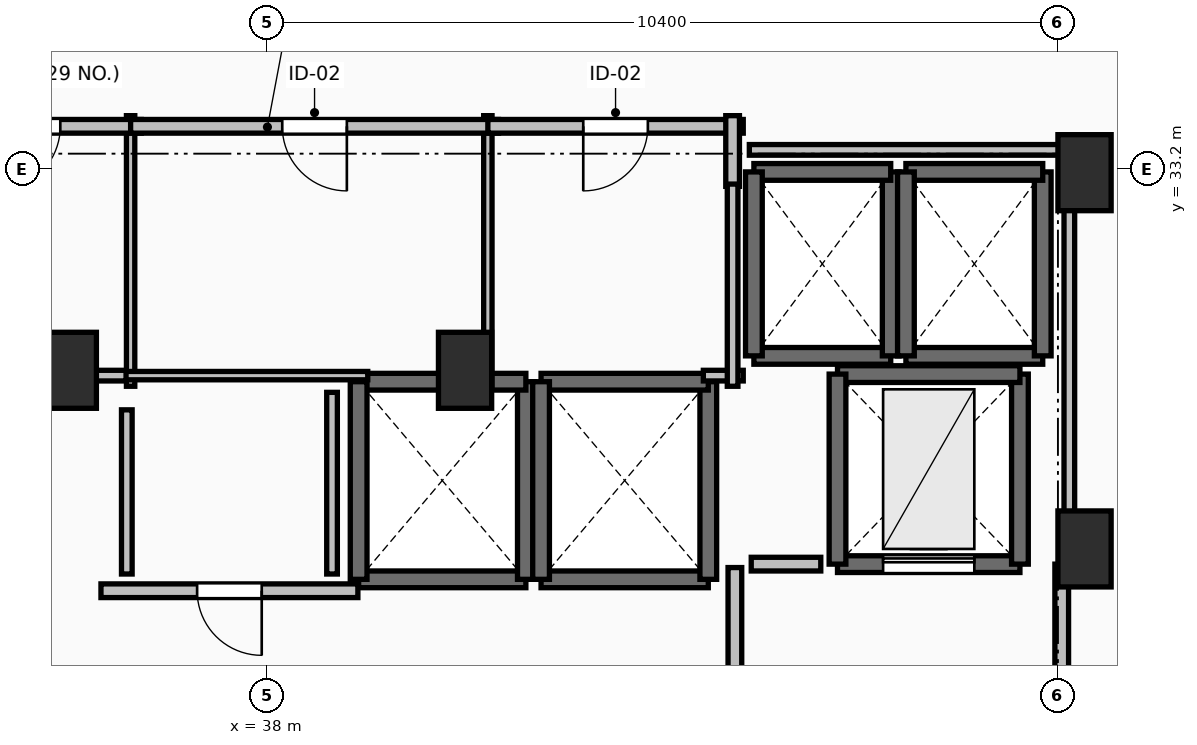
"""IFC4 building model, lengths in metres.
Left out: names, types, materials, properties, quantities, classifications, styles, units other than length and angle.
Written with IfcOpenShell. Run it as: python <this file> out.ifc"""

import sys

from ifc_helpers import new_model, si_unit, direction, frame, frame_2d, origin, origin_2d, place, context, subcontext, project, spatial, rectangle, extrude, element, fill, save


model = new_model("IFC4")
c1 = context("Model", 3, precision=1e-05, world=origin(), true_north=direction((0.0, 1.0)))
c2 = subcontext(c1, "Body", "Model", "MODEL_VIEW")
j1 = project(units=[si_unit("LENGTHUNIT", "METRE"), si_unit("PLANEANGLEUNIT", "RADIAN")], contexts=[c1])
p1 = place(None, origin())
s1 = spatial("IfcSite", under=j1, at=p1, CompositionType="ELEMENT")
p2 = place(p1, origin())
s2 = spatial("IfcBuilding", under=s1, at=p2, CompositionType="ELEMENT")
p3 = place(p2, frame((0.0, 0.0, 203.65)))
s3 = spatial("IfcBuildingStorey", under=s2, at=p3, CompositionType="ELEMENT", Elevation=203.65)
for number, where, z_axis, x_axis in (
    (1, (48.75, 33.15, 0.0), (0.0, 0.0, 1.0), (1.0, 0.0, 0.0)),
    (2, (48.75, 28.2, 0.0), (0.0, 0.0, 1.0), (1.0, 0.0, 0.0)),
    (3, (35.4, 30.55, 0.0), (0.0, 0.0, 1.0), (1.0, 0.0, 0.0)),
    (4, (40.6, 30.55, 0.0), (0.0, 0.0, 1.0), (1.0, 0.0, 0.0)),
):
    element("IfcColumn", number, at=place(p3, frame(where, z_axis=z_axis, x_axis=x_axis)), inside=s3, PredefinedType="PILASTER", context=c2, shape_type="SweptSolid", body=[
        extrude(rectangle(XDim=0.7, YDim=1.0, at=origin_2d()), origin(), (0.0, 0.0, 1.0), 3.55),
    ])
p4 = place(p3, frame((39.2, 27.8, 0.0), z_axis=(0.0, 0.0, 1.0), x_axis=(1.0, 0.0, 0.0)))
e5 = element("IfcWall", 5, at=p4, inside=s3, PredefinedType="SOLIDWALL", context=c2, shape_type="SweptSolid", body=[
    extrude(rectangle(XDim=2.2, YDim=0.22, at=frame_2d((1.1, 0.0))), origin(), (0.0, 0.0, 1.0), 3.29),
])
p5 = place(p3, frame((41.4, 27.8, 0.0), z_axis=(0.0, 0.0, 1.0), x_axis=(0.0, 1.0, 0.0)))
e6 = element("IfcWall", 6, at=p5, inside=s3, PredefinedType="SOLIDWALL", context=c2, shape_type="SweptSolid", body=[
    extrude(rectangle(XDim=2.6, YDim=0.22, at=frame_2d((1.3, 0.0))), origin(), (0.0, 0.0, 1.0), 3.29),
])
p6 = place(p3, frame((41.4, 30.4, 0.0), z_axis=(0.0, 0.0, 1.0), x_axis=(-1.0, 0.0, 0.0)))
e7 = element("IfcWall", 7, at=p6, inside=s3, PredefinedType="SOLIDWALL", context=c2, shape_type="SweptSolid", body=[
    extrude(rectangle(XDim=2.2, YDim=0.22, at=frame_2d((1.1, 0.0))), origin(), (0.0, 0.0, 1.0), 3.29),
])
p7 = place(p3, frame((39.2, 30.4, 0.0), z_axis=(0.0, 0.0, 1.0), x_axis=(0.0, -1.0, 0.0)))
e8 = element("IfcWall", 8, at=p7, inside=s3, PredefinedType="SOLIDWALL", context=c2, shape_type="SweptSolid", body=[
    extrude(rectangle(XDim=2.6, YDim=0.22, at=frame_2d((1.3, 0.0))), origin(), (0.0, 0.0, 1.0), 3.29),
])
p8 = place(p3, frame((41.6, 27.8, 0.0), z_axis=(0.0, 0.0, 1.0), x_axis=(1.0, 0.0, 0.0)))
e9 = element("IfcWall", 9, at=p8, inside=s3, PredefinedType="SOLIDWALL", context=c2, shape_type="SweptSolid", body=[
    extrude(rectangle(XDim=2.2, YDim=0.22, at=frame_2d((1.1, 0.0))), origin(), (0.0, 0.0, 1.0), 3.29),
])
p9 = place(p3, frame((43.8, 27.8, 0.0), z_axis=(0.0, 0.0, 1.0), x_axis=(0.0, 1.0, 0.0)))
e10 = element("IfcWall", 10, at=p9, inside=s3, PredefinedType="SOLIDWALL", context=c2, shape_type="SweptSolid", body=[
    extrude(rectangle(XDim=2.6, YDim=0.22, at=frame_2d((1.3, 0.0))), origin(), (0.0, 0.0, 1.0), 3.29),
])
p10 = place(p3, frame((43.8, 30.4, 0.0), z_axis=(0.0, 0.0, 1.0), x_axis=(-1.0, 0.0, 0.0)))
e11 = element("IfcWall", 11, at=p10, inside=s3, PredefinedType="SOLIDWALL", context=c2, shape_type="SweptSolid", body=[
    extrude(rectangle(XDim=2.2, YDim=0.22, at=frame_2d((1.1, 0.0))), origin(), (0.0, 0.0, 1.0), 3.29),
])
p11 = place(p3, frame((41.6, 30.4, 0.0), z_axis=(0.0, 0.0, 1.0), x_axis=(0.0, -1.0, 0.0)))
e12 = element("IfcWall", 12, at=p11, inside=s3, PredefinedType="SOLIDWALL", context=c2, shape_type="SweptSolid", body=[
    extrude(rectangle(XDim=2.6, YDim=0.22, at=frame_2d((1.3, 0.0))), origin(), (0.0, 0.0, 1.0), 3.29),
])
p12 = place(p3, frame((44.4, 30.74, 0.0), z_axis=(0.0, 0.0, 1.0), x_axis=(1.0, 0.0, 0.0)))
e13 = element("IfcWall", 13, at=p12, inside=s3, PredefinedType="SOLIDWALL", context=c2, shape_type="SweptSolid", body=[
    extrude(rectangle(XDim=1.8, YDim=0.22, at=frame_2d((0.9, 0.0))), origin(), (0.0, 0.0, 1.0), 3.29),
])
p13 = place(p3, frame((46.2, 30.74, 0.0), z_axis=(0.0, 0.0, 1.0), x_axis=(0.0, 1.0, 0.0)))
e14 = element("IfcWall", 14, at=p13, inside=s3, PredefinedType="SOLIDWALL", context=c2, shape_type="SweptSolid", body=[
    extrude(rectangle(XDim=2.42, YDim=0.22, at=frame_2d((1.21, 0.0))), origin(), (0.0, 0.0, 1.0), 3.29),
])
p14 = place(p3, frame((46.2, 33.16, 0.0), z_axis=(0.0, 0.0, 1.0), x_axis=(-1.0, 0.0, 0.0)))
e15 = element("IfcWall", 15, at=p14, inside=s3, PredefinedType="SOLIDWALL", context=c2, shape_type="SweptSolid", body=[
    extrude(rectangle(XDim=1.8, YDim=0.22, at=frame_2d((0.9, 0.0))), origin(), (0.0, 0.0, 1.0), 3.29),
])
p15 = place(p3, frame((44.4, 33.16, 0.0), z_axis=(0.0, 0.0, 1.0), x_axis=(0.0, -1.0, 0.0)))
e16 = element("IfcWall", 16, at=p15, inside=s3, PredefinedType="SOLIDWALL", context=c2, shape_type="SweptSolid", body=[
    extrude(rectangle(XDim=2.42, YDim=0.22, at=frame_2d((1.21, 0.0))), origin(), (0.0, 0.0, 1.0), 3.29),
])
p16 = place(p3, frame((46.4, 30.74, 0.0), z_axis=(0.0, 0.0, 1.0), x_axis=(1.0, 0.0, 0.0)))
e17 = element("IfcWall", 17, at=p16, inside=s3, PredefinedType="SOLIDWALL", context=c2, shape_type="SweptSolid", body=[
    extrude(rectangle(XDim=1.8, YDim=0.22, at=frame_2d((0.9, 0.0))), origin(), (0.0, 0.0, 1.0), 3.29),
])
p17 = place(p3, frame((48.2, 30.74, 0.0), z_axis=(0.0, 0.0, 1.0), x_axis=(0.0, 1.0, 0.0)))
e18 = element("IfcWall", 18, at=p17, inside=s3, PredefinedType="SOLIDWALL", context=c2, shape_type="SweptSolid", body=[
    extrude(rectangle(XDim=2.42, YDim=0.22, at=frame_2d((1.21, 0.0))), origin(), (0.0, 0.0, 1.0), 3.29),
])
p18 = place(p3, frame((48.2, 33.16, 0.0), z_axis=(0.0, 0.0, 1.0), x_axis=(-1.0, 0.0, 0.0)))
e19 = element("IfcWall", 19, at=p18, inside=s3, PredefinedType="SOLIDWALL", context=c2, shape_type="SweptSolid", body=[
    extrude(rectangle(XDim=1.8, YDim=0.22, at=frame_2d((0.9, 0.0))), origin(), (0.0, 0.0, 1.0), 3.29),
])
p19 = place(p3, frame((46.4, 33.16, 0.0), z_axis=(0.0, 0.0, 1.0), x_axis=(0.0, -1.0, 0.0)))
e20 = element("IfcWall", 20, at=p19, inside=s3, PredefinedType="SOLIDWALL", context=c2, shape_type="SweptSolid", body=[
    extrude(rectangle(XDim=2.42, YDim=0.22, at=frame_2d((1.21, 0.0))), origin(), (0.0, 0.0, 1.0), 3.29),
])
p20 = place(p3, frame((45.5, 28.0, 0.0), z_axis=(0.0, 0.0, 1.0), x_axis=(1.0, 0.0, 0.0)))
e21 = element("IfcWall", 21, at=p20, inside=s3, PredefinedType="SHEAR", context=c2, shape_type="SweptSolid", body=[
    extrude(rectangle(XDim=2.4, YDim=0.22, at=frame_2d((1.2, 0.0))), origin(), (0.0, 0.0, 1.0), 3.29),
])
p21 = place(p20, frame((0.6, 0.0, 0.0)))
e22 = element("IfcOpeningElement", 22, at=p21, cuts=e21, PredefinedType="OPENING", context=c2, shape_type="SweptSolid", body=[
    extrude(rectangle(XDim=1.2, YDim=2.2, at=frame_2d((0.6, 1.1))), frame((0.0, 0.125, 0.0), z_axis=(0.0, -1.0, 0.0), x_axis=(1.0, 0.0, 0.0)), (0.0, 0.0, 1.0), 0.25),
])
p22 = place(p3, frame((47.9, 28.0, 0.0), z_axis=(0.0, 0.0, 1.0), x_axis=(0.0, 1.0, 0.0)))
e23 = element("IfcWall", 23, at=p22, inside=s3, PredefinedType="SHEAR", context=c2, shape_type="SweptSolid", body=[
    extrude(rectangle(XDim=2.5, YDim=0.22, at=frame_2d((1.25, 0.0))), origin(), (0.0, 0.0, 1.0), 3.29),
])
p23 = place(p3, frame((47.9, 30.5, 0.0), z_axis=(0.0, 0.0, 1.0), x_axis=(-1.0, 0.0, 0.0)))
e24 = element("IfcWall", 24, at=p23, inside=s3, PredefinedType="SHEAR", context=c2, shape_type="SweptSolid", body=[
    extrude(rectangle(XDim=2.4, YDim=0.22, at=frame_2d((1.2, 0.0))), origin(), (0.0, 0.0, 1.0), 3.29),
])
p24 = place(p3, frame((45.5, 30.5, 0.0), z_axis=(0.0, 0.0, 1.0), x_axis=(0.0, -1.0, 0.0)))
e25 = element("IfcWall", 25, at=p24, inside=s3, PredefinedType="SHEAR", context=c2, shape_type="SweptSolid", body=[
    extrude(rectangle(XDim=2.5, YDim=0.22, at=frame_2d((1.25, 0.0))), origin(), (0.0, 0.0, 1.0), 3.29),
])
p25 = place(p3, frame((44.15, 27.955, 0.0), z_axis=(0.0, 0.0, 1.0), x_axis=(0.0, -1.0, 0.0)))
e26 = element("IfcWall", 26, at=p25, inside=s3, PredefinedType="PARTITIONING", context=c2, shape_type="SweptSolid", body=[
    extrude(rectangle(XDim=3.91, YDim=0.18, at=frame_2d((1.955, 0.0))), origin(), (0.0, 0.0, 1.0), 3.29),
])
p26 = place(p25, frame((1.355, 0.0, 0.0)))
e27 = element("IfcOpeningElement", 27, at=p26, cuts=e26, PredefinedType="OPENING", context=c2, shape_type="SweptSolid", body=[
    extrude(rectangle(XDim=1.2, YDim=2.15, at=frame_2d((0.6, 1.075))), frame((0.0, 0.105, 0.0), z_axis=(0.0, -1.0, 0.0), x_axis=(1.0, 0.0, 0.0)), (0.0, 0.0, 1.0), 0.21),
])
p27 = place(p3, frame((48.45, 23.95, 0.0), z_axis=(0.0, 0.0, 1.0), x_axis=(0.0, 1.0, 0.0)))
e28 = element("IfcWall", 28, at=p27, inside=s3, PredefinedType="PARTITIONING", context=c2, shape_type="SweptSolid", body=[
    extrude(rectangle(XDim=4.05, YDim=0.18, at=frame_2d((2.025, 0.0))), origin(), (0.0, 0.0, 1.0), 3.29),
])
p28 = place(p27, frame((1.425, 0.0, 0.0)))
e29 = element("IfcOpeningElement", 29, at=p28, cuts=e28, PredefinedType="OPENING", context=c2, shape_type="SweptSolid", body=[
    extrude(rectangle(XDim=1.2, YDim=2.15, at=frame_2d((0.6, 1.075))), frame((0.0, 0.105, 0.0), z_axis=(0.0, -1.0, 0.0), x_axis=(1.0, 0.0, 0.0)), (0.0, 0.0, 1.0), 0.21),
])
p29 = place(p3, frame((39.19, 27.65, 0.0), z_axis=(0.0, 0.0, 1.0), x_axis=(-1.0, 0.0, 0.0)))
e30 = element("IfcWall", 30, at=p29, inside=s3, PredefinedType="PARTITIONING", context=c2, shape_type="SweptSolid", body=[
    extrude(rectangle(XDim=3.38, YDim=0.18, at=frame_2d((1.69, 0.0))), origin(), (0.0, 0.0, 1.0), 3.29),
])
p30 = place(p29, frame((1.265, 0.0, 0.0)))
e31 = element("IfcOpeningElement", 31, at=p30, cuts=e30, PredefinedType="OPENING", context=c2, shape_type="SweptSolid", body=[
    extrude(rectangle(XDim=0.85, YDim=2.1, at=frame_2d((0.425, 1.05))), frame((0.0, 0.105, 0.0), z_axis=(0.0, -1.0, 0.0), x_axis=(1.0, 0.0, 0.0)), (0.0, 0.0, 1.0), 0.21),
])
p31 = place(p3, frame((36.2, 30.34, 0.0), z_axis=(0.0, 0.0, 1.0), x_axis=(0.0, 1.0, 0.0)))
e32 = element("IfcWall", 32, at=p31, inside=s3, PredefinedType="PARTITIONING", context=c2, shape_type="SweptSolid", body=[
    extrude(rectangle(XDim=3.56, YDim=0.11, at=frame_2d((1.78, 0.0))), origin(), (0.0, 0.0, 1.0), 2.482),
])
p32 = place(p3, frame((36.34, 33.76, 0.0), z_axis=(0.0, 0.0, 1.0), x_axis=(-1.0, 0.0, 0.0)))
e33 = element("IfcWall", 33, at=p32, inside=s3, PredefinedType="PARTITIONING", context=c2, shape_type="SweptSolid", body=[
    extrude(rectangle(XDim=2.98, YDim=0.18, at=frame_2d((1.49, 0.0))), origin(), (0.0, 0.0, 1.0), 3.29),
])
p33 = place(p32, frame((1.065, 0.0, 0.0)))
e34 = element("IfcOpeningElement", 34, at=p33, cuts=e33, PredefinedType="OPENING", context=c2, shape_type="SweptSolid", body=[
    extrude(rectangle(XDim=0.85, YDim=2.1, at=frame_2d((0.425, 1.05))), frame((0.0, 0.105, 0.0), z_axis=(0.0, -1.0, 0.0), x_axis=(1.0, 0.0, 0.0)), (0.0, 0.0, 1.0), 0.21),
])
p34 = place(p3, frame((40.9, 30.34, 0.0), z_axis=(0.0, 0.0, 1.0), x_axis=(0.0, 1.0, 0.0)))
e35 = element("IfcWall", 35, at=p34, inside=s3, PredefinedType="PARTITIONING", context=c2, shape_type="SweptSolid", body=[
    extrude(rectangle(XDim=3.56, YDim=0.11, at=frame_2d((1.78, 0.0))), origin(), (0.0, 0.0, 1.0), 3.29),
])
p35 = place(p3, frame((36.11, 30.48, 0.0), z_axis=(0.0, 0.0, 1.0), x_axis=(1.0, 0.0, 0.0)))
e36 = element("IfcWall", 36, at=p35, inside=s3, PredefinedType="PARTITIONING", context=c2, shape_type="SweptSolid", body=[
    extrude(rectangle(XDim=3.21, YDim=0.11, at=frame_2d((1.605, 0.0))), origin(), (0.0, 0.0, 1.0), 2.482),
])
p36 = place(p3, frame((41.04, 33.76, 0.0), z_axis=(0.0, 0.0, 1.0), x_axis=(-1.0, 0.0, 0.0)))
e37 = element("IfcWall", 37, at=p36, inside=s3, PredefinedType="PARTITIONING", context=c2, shape_type="SweptSolid", body=[
    extrude(rectangle(XDim=4.84, YDim=0.18, at=frame_2d((2.42, 0.0))), origin(), (0.0, 0.0, 1.0), 3.29),
])
p37 = place(p36, frame((1.995, 0.0, 0.0)))
e38 = element("IfcOpeningElement", 38, at=p37, cuts=e37, PredefinedType="OPENING", context=c2, shape_type="SweptSolid", body=[
    extrude(rectangle(XDim=0.85, YDim=2.1, at=frame_2d((0.425, 1.05))), frame((0.0, 0.105, 0.0), z_axis=(0.0, -1.0, 0.0), x_axis=(1.0, 0.0, 0.0)), (0.0, 0.0, 1.0), 0.21),
])
p38 = place(p3, frame((44.26, 33.76, 0.0), z_axis=(0.0, 0.0, 1.0), x_axis=(-1.0, 0.0, 0.0)))
e39 = element("IfcWall", 39, at=p38, inside=s3, PredefinedType="PARTITIONING", context=c2, shape_type="SweptSolid", body=[
    extrude(rectangle(XDim=3.36, YDim=0.18, at=frame_2d((1.68, 0.0))), origin(), (0.0, 0.0, 1.0), 3.29),
])
p39 = place(p38, frame((1.255, 0.0, 0.0)))
e40 = element("IfcOpeningElement", 40, at=p39, cuts=e39, PredefinedType="OPENING", context=c2, shape_type="SweptSolid", body=[
    extrude(rectangle(XDim=0.85, YDim=2.1, at=frame_2d((0.425, 1.05))), frame((0.0, 0.105, 0.0), z_axis=(0.0, -1.0, 0.0), x_axis=(1.0, 0.0, 0.0)), (0.0, 0.0, 1.0), 0.21),
])
p40 = place(p3, frame((44.12, 32.97, 0.0), z_axis=(0.0, 0.0, 1.0), x_axis=(0.0, 1.0, 0.0)))
e41 = element("IfcWall", 41, at=p40, inside=s3, PredefinedType="PARTITIONING", context=c2, shape_type="SweptSolid", body=[
    extrude(rectangle(XDim=0.93, YDim=0.18, at=frame_2d((0.465, 0.0))), origin(), (0.0, 0.0, 1.0), 3.29),
])
p41 = place(p3, frame((45.28, 28.0, 0.0), z_axis=(0.0, 0.0, 1.0), x_axis=(-1.0, 0.0, 0.0)))
e42 = element("IfcWall", 42, at=p41, inside=s3, PredefinedType="PARTITIONING", context=c2, shape_type="SweptSolid", body=[
    extrude(rectangle(XDim=0.915, YDim=0.18, at=frame_2d((0.458, 0.0))), origin(), (0.0, 0.0, 1.0), 3.29),
])
p42 = place(p3, frame((35.14, 30.48, 0.0), z_axis=(0.0, 0.0, 1.0), x_axis=(1.0, 0.0, 0.0)))
e43 = element("IfcWall", 43, at=p42, inside=s3, PredefinedType="PARTITIONING", context=c2, shape_type="SweptSolid", body=[
    extrude(rectangle(XDim=1.0, YDim=0.14, at=frame_2d((0.5, 0.0))), origin(), (0.0, 0.0, 1.0), 2.482),
])
p43 = place(p3, frame((43.735, 30.48, 0.0), z_axis=(0.0, 0.0, 1.0), x_axis=(1.0, 0.0, 0.0)))
e44 = element("IfcWall", 44, at=p43, inside=s3, PredefinedType="PARTITIONING", context=c2, shape_type="SweptSolid", body=[
    extrude(rectangle(XDim=0.525, YDim=0.14, at=frame_2d((0.262, 0.0))), origin(), (0.0, 0.0, 1.0), 3.29),
])
p44 = place(p3, frame((44.12, 30.34, 0.0), z_axis=(0.0, 0.0, 1.0), x_axis=(0.0, 1.0, 0.0)))
e45 = element("IfcWall", 45, at=p44, inside=s3, PredefinedType="PARTITIONING", context=c2, shape_type="SweptSolid", body=[
    extrude(rectangle(XDim=2.66, YDim=0.14, at=frame_2d((1.33, 0.0))), origin(), (0.0, 0.0, 1.0), 3.29),
])
p45 = place(p3, frame((36.15, 30.03, 0.0), z_axis=(0.0, 0.0, 1.0), x_axis=(0.0, -1.0, 0.0)))
e46 = element("IfcWall", 46, at=p45, inside=s3, PredefinedType="PARTITIONING", context=c2, shape_type="SweptSolid", body=[
    extrude(rectangle(XDim=2.16, YDim=0.14, at=frame_2d((1.08, 0.0))), origin(), (0.0, 0.0, 1.0), 3.29),
])
p46 = place(p3, frame((38.85, 27.87, 0.0), z_axis=(0.0, 0.0, 1.0), x_axis=(0.0, 1.0, 0.0)))
e47 = element("IfcWall", 47, at=p46, inside=s3, PredefinedType="PARTITIONING", context=c2, shape_type="SweptSolid", body=[
    extrude(rectangle(XDim=2.39, YDim=0.14, at=frame_2d((1.195, 0.0))), origin(), (0.0, 0.0, 1.0), 3.29),
])
p47 = place(p3, frame((48.55, 28.196, 0.0), z_axis=(0.0, 0.0, 1.0), x_axis=(0.0, 1.0, 0.0)))
e48 = element("IfcWall", 48, at=p47, inside=s3, PredefinedType="PARTITIONING", context=c2, shape_type="SweptSolid", body=[
    extrude(rectangle(XDim=5.254, YDim=0.14, at=frame_2d((2.627, 0.0))), origin(), (0.0, 0.0, 1.0), 2.482),
])
p48 = place(p3, frame((48.55, 33.45, 0.0), z_axis=(0.0, 0.0, 1.0), x_axis=(-1.0, 0.0, 0.0)))
e49 = element("IfcWall", 49, at=p48, inside=s3, PredefinedType="PARTITIONING", context=c2, shape_type="SweptSolid", body=[
    extrude(rectangle(XDim=4.21, YDim=0.14, at=frame_2d((2.105, 0.0))), origin(), (0.0, 0.0, 1.0), 2.482),
])
p49 = place(p21, origin())
e50 = element("IfcDoor", 50, at=p49, inside=s3, OperationType="SLIDING_TO_LEFT", PredefinedType="DOOR", context=c2, shape_type="SweptSolid", body=[
    extrude(rectangle(XDim=1.2, YDim=2.2, at=frame_2d((0.6, 1.1))), frame((0.0, 0.025, 0.0), z_axis=(0.0, -1.0, 0.0), x_axis=(1.0, 0.0, 0.0)), (0.0, 0.0, 1.0), 0.05),
])
fill(e22, e50)
p50 = place(p30, origin())
e51 = element("IfcDoor", 51, at=p50, inside=s3, OperationType="SINGLE_SWING_LEFT", PredefinedType="DOOR", context=c2, shape_type="SweptSolid", body=[
    extrude(rectangle(XDim=0.85, YDim=2.1, at=frame_2d((0.425, 1.05))), frame((0.0, 0.025, 0.0), z_axis=(0.0, -1.0, 0.0), x_axis=(1.0, 0.0, 0.0)), (0.0, 0.0, 1.0), 0.05),
])
fill(e31, e51)
p51 = place(p33, origin())
e52 = element("IfcDoor", 52, at=p51, inside=s3, OperationType="SINGLE_SWING_RIGHT", PredefinedType="DOOR", context=c2, shape_type="SweptSolid", body=[
    extrude(rectangle(XDim=0.85, YDim=2.1, at=frame_2d((0.425, 1.05))), frame((0.0, 0.025, 0.0), z_axis=(0.0, -1.0, 0.0), x_axis=(1.0, 0.0, 0.0)), (0.0, 0.0, 1.0), 0.05),
])
fill(e34, e52)
p52 = place(p37, origin())
e53 = element("IfcDoor", 53, at=p52, inside=s3, OperationType="SINGLE_SWING_LEFT", PredefinedType="DOOR", context=c2, shape_type="SweptSolid", body=[
    extrude(rectangle(XDim=0.85, YDim=2.1, at=frame_2d((0.425, 1.05))), frame((0.0, 0.025, 0.0), z_axis=(0.0, -1.0, 0.0), x_axis=(1.0, 0.0, 0.0)), (0.0, 0.0, 1.0), 0.05),
])
fill(e38, e53)
p53 = place(p39, origin())
e54 = element("IfcDoor", 54, at=p53, inside=s3, OperationType="SINGLE_SWING_RIGHT", PredefinedType="DOOR", context=c2, shape_type="SweptSolid", body=[
    extrude(rectangle(XDim=0.85, YDim=2.1, at=frame_2d((0.425, 1.05))), frame((0.0, 0.025, 0.0), z_axis=(0.0, -1.0, 0.0), x_axis=(1.0, 0.0, 0.0)), (0.0, 0.0, 1.0), 0.05),
])
fill(e40, e54)
save(model, sys.argv[1])
